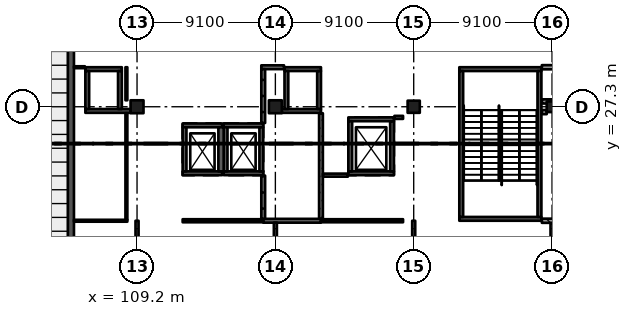
"""IFC4 building model, lengths in metres.
Left out: names, types, materials, properties, quantities, classifications, styles, units other than length and angle.
Written with IfcOpenShell. Run it as: python <this file> out.ifc"""

import sys

from ifc_helpers import new_model, si_unit, direction, frame, frame_2d, origin, origin_2d, place, context, subcontext, project, spatial, rectangle, extrude, element, fill, save


model = new_model("IFC4")
c1 = context("Model", 3, precision=1e-05, world=origin(), true_north=direction((0.0, 1.0)))
c2 = subcontext(c1, "Body", "Model", "MODEL_VIEW")
j1 = project(units=[si_unit("LENGTHUNIT", "METRE"), si_unit("PLANEANGLEUNIT", "RADIAN")], contexts=[c1])
p1 = place(None, origin())
s1 = spatial("IfcSite", under=j1, at=p1, CompositionType="ELEMENT")
p2 = place(p1, origin())
s2 = spatial("IfcBuilding", under=s1, at=p2, CompositionType="ELEMENT")
p3 = place(p2, origin())
s3 = spatial("IfcBuildingStorey", under=s2, at=p3, CompositionType="ELEMENT", Elevation=0.0)
for number, where, z_axis, x_axis in (
    (1, (109.2, 27.3, -0.4), (0.0, 0.0, 1.0), (1.0, 0.0, 0.0)),
    (2, (118.3, 27.3, -0.4), (0.0, 0.0, 1.0), (1.0, 0.0, 0.0)),
):
    element("IfcColumn", number, at=place(p3, frame(where, z_axis=z_axis, x_axis=x_axis)), inside=s3, PredefinedType="COLUMN", context=c2, shape_type="SweptSolid", body=[
        extrude(rectangle(XDim=0.85, YDim=0.85, at=origin_2d()), origin(), (0.0, 0.0, 1.0), 6.77),
    ])
p4 = place(p3, frame((127.4, 27.3, -0.4), z_axis=(0.0, 0.0, 1.0), x_axis=(1.0, 0.0, 0.0)))
e3 = element("IfcColumn", 3, at=p4, inside=s3, PredefinedType="COLUMN", context=c2, shape_type="SweptSolid", body=[
    extrude(rectangle(XDim=0.8, YDim=0.8, at=origin_2d()), origin(), (0.0, 0.0, 1.0), 6.77),
])
p5 = place(p3, frame((136.5, 27.3, -0.4), z_axis=(0.0, 0.0, 1.0), x_axis=(1.0, 0.0, 0.0)))
e4 = element("IfcColumn", 4, at=p5, inside=s3, PredefinedType="COLUMN", context=c2, shape_type="SweptSolid", body=[
    extrude(rectangle(XDim=0.7, YDim=0.7, at=origin_2d()), origin(), (0.0, 0.0, 1.0), 6.77),
])
p6 = place(p3, frame((104.85, 36.4, -0.4), z_axis=(0.0, 0.0, 1.0), x_axis=(0.0, -1.0, 0.0)))
e5 = element("IfcWall", 5, at=p6, inside=s3, PredefinedType="SHEAR", context=c2, shape_type="SweptSolid", body=[
    extrude(rectangle(XDim=18.2, YDim=0.4, at=frame_2d((9.1, 0.0))), origin(), (0.0, 0.0, 1.0), 6.77),
])
p7 = place(p3, frame((117.5, 22.925, -1.4), z_axis=(0.0, 0.0, 1.0), x_axis=(-1.0, 0.0, 0.0)))
e6 = element("IfcWall", 6, at=p7, inside=s3, PredefinedType="SHEAR", context=c2, shape_type="SweptSolid", body=[
    extrude(rectangle(XDim=2.6, YDim=0.25, at=frame_2d((1.3, 0.0))), origin(), (0.0, 0.0, 1.0), 7.77),
])
p8 = place(p7, frame((0.8, 0.0, 1.4)))
e7 = element("IfcOpeningElement", 7, at=p8, cuts=e6, PredefinedType="OPENING", context=c2, shape_type="SweptSolid", body=[
    extrude(rectangle(XDim=1.0, YDim=2.1, at=frame_2d((0.5, 1.05))), frame((0.0, 0.135, 0.0), z_axis=(0.0, -1.0, 0.0), x_axis=(1.0, 0.0, 0.0)), (0.0, 0.0, 1.0), 0.27),
])
p9 = place(p3, frame((117.5, 26.075, -1.4), z_axis=(0.0, 0.0, 1.0), x_axis=(-1.0, 0.0, 0.0)))
e8 = element("IfcWall", 8, at=p9, inside=s3, PredefinedType="SHEAR", context=c2, shape_type="SweptSolid", body=[
    extrude(rectangle(XDim=2.6, YDim=0.25, at=frame_2d((1.3, 0.0))), origin(), (0.0, 0.0, 1.0), 7.77),
])
for number, where, z_axis, x_axis in (
    (9, (115.025, 25.95, -1.4), (0.0, 0.0, 1.0), (0.0, -1.0, 0.0)),
    (10, (117.375, 25.95, -1.4), (0.0, 0.0, 1.0), (0.0, -1.0, 0.0)),
):
    element("IfcWall", number, at=place(p3, frame(where, z_axis=z_axis, x_axis=x_axis)), inside=s3, PredefinedType="SHEAR", context=c2, shape_type="SweptSolid", body=[
        extrude(rectangle(XDim=2.9, YDim=0.25, at=frame_2d((1.45, 0.0))), origin(), (0.0, 0.0, 1.0), 7.77),
    ])
p10 = place(p3, frame((114.8, 22.925, -1.4), z_axis=(0.0, 0.0, 1.0), x_axis=(-1.0, 0.0, 0.0)))
e11 = element("IfcWall", 11, at=p10, inside=s3, PredefinedType="SHEAR", context=c2, shape_type="SweptSolid", body=[
    extrude(rectangle(XDim=2.6, YDim=0.25, at=frame_2d((1.3, 0.0))), origin(), (0.0, 0.0, 1.0), 7.77),
])
p11 = place(p10, frame((0.8, 0.0, 1.4)))
e12 = element("IfcOpeningElement", 12, at=p11, cuts=e11, PredefinedType="OPENING", context=c2, shape_type="SweptSolid", body=[
    extrude(rectangle(XDim=1.0, YDim=2.1, at=frame_2d((0.5, 1.05))), frame((0.0, 0.135, 0.0), z_axis=(0.0, -1.0, 0.0), x_axis=(1.0, 0.0, 0.0)), (0.0, 0.0, 1.0), 0.27),
])
p12 = place(p3, frame((114.8, 26.075, -1.4), z_axis=(0.0, 0.0, 1.0), x_axis=(-1.0, 0.0, 0.0)))
e13 = element("IfcWall", 13, at=p12, inside=s3, PredefinedType="SHEAR", context=c2, shape_type="SweptSolid", body=[
    extrude(rectangle(XDim=2.6, YDim=0.25, at=frame_2d((1.3, 0.0))), origin(), (0.0, 0.0, 1.0), 7.77),
])
p13 = place(p3, frame((112.325, 25.95, -1.4), z_axis=(0.0, 0.0, 1.0), x_axis=(0.0, -1.0, 0.0)))
e14 = element("IfcWall", 14, at=p13, inside=s3, PredefinedType="SHEAR", context=c2, shape_type="SweptSolid", body=[
    extrude(rectangle(XDim=2.9, YDim=0.25, at=frame_2d((1.45, 0.0))), origin(), (0.0, 0.0, 1.0), 7.77),
])
p14 = place(p3, frame((114.725, 25.95, -1.4), z_axis=(0.0, 0.0, 1.0), x_axis=(0.0, -1.0, 0.0)))
e15 = element("IfcWall", 15, at=p14, inside=s3, PredefinedType="SHEAR", context=c2, shape_type="SweptSolid", body=[
    extrude(rectangle(XDim=2.9, YDim=0.35, at=frame_2d((1.45, 0.0))), origin(), (0.0, 0.0, 1.0), 7.77),
])
p15 = place(p3, frame((108.775, 27.025, -0.4), z_axis=(0.0, 0.0, 1.0), x_axis=(-1.0, 0.0, 0.0)))
e16 = element("IfcWall", 16, at=p15, inside=s3, PredefinedType="SHEAR", context=c2, shape_type="SweptSolid", body=[
    extrude(rectangle(XDim=2.975, YDim=0.25, at=frame_2d((1.487, 0.0))), origin(), (0.0, 0.0, 1.0), 6.77),
])
p16 = place(p15, frame((0.75, 0.0, 0.4)))
e17 = element("IfcOpeningElement", 17, at=p16, cuts=e16, PredefinedType="OPENING", context=c2, shape_type="SweptSolid", body=[
    extrude(rectangle(XDim=0.9, YDim=2.1, at=frame_2d((0.45, 1.05))), frame((0.0, 0.135, 0.0), z_axis=(0.0, -1.0, 0.0), x_axis=(1.0, 0.0, 0.0)), (0.0, 0.0, 1.0), 0.27),
])
p17 = place(p3, frame((108.2, 29.775, -0.4), z_axis=(0.0, 0.0, 1.0), x_axis=(-1.0, 0.0, 0.0)))
e18 = element("IfcWall", 18, at=p17, inside=s3, PredefinedType="SHEAR", context=c2, shape_type="SweptSolid", body=[
    extrude(rectangle(XDim=2.4, YDim=0.25, at=frame_2d((1.2, 0.0))), origin(), (0.0, 0.0, 1.0), 6.77),
])
for number, where, z_axis, x_axis in (
    (19, (105.925, 29.65, -0.4), (0.0, 0.0, 1.0), (0.0, -1.0, 0.0)),
    (20, (108.075, 29.65, -0.4), (0.0, 0.0, 1.0), (0.0, -1.0, 0.0)),
):
    element("IfcWall", number, at=place(p3, frame(where, z_axis=z_axis, x_axis=x_axis)), inside=s3, PredefinedType="SHEAR", context=c2, shape_type="SweptSolid", body=[
        extrude(rectangle(XDim=2.5, YDim=0.25, at=frame_2d((1.25, 0.0))), origin(), (0.0, 0.0, 1.0), 6.77),
    ])
p18 = place(p3, frame((121.3, 27.025, -0.4), z_axis=(0.0, 0.0, 1.0), x_axis=(-1.0, 0.0, 0.0)))
e21 = element("IfcWall", 21, at=p18, inside=s3, PredefinedType="SHEAR", context=c2, shape_type="SweptSolid", body=[
    extrude(rectangle(XDim=2.575, YDim=0.25, at=frame_2d((1.288, 0.0))), origin(), (0.0, 0.0, 1.0), 6.77),
])
p19 = place(p3, frame((121.3, 29.775, -0.4), z_axis=(0.0, 0.0, 1.0), x_axis=(-1.0, 0.0, 0.0)))
e22 = element("IfcWall", 22, at=p19, inside=s3, PredefinedType="SHEAR", context=c2, shape_type="SweptSolid", body=[
    extrude(rectangle(XDim=2.4, YDim=0.25, at=frame_2d((1.2, 0.0))), origin(), (0.0, 0.0, 1.0), 6.77),
])
p20 = place(p3, frame((119.025, 29.65, -0.4), z_axis=(0.0, 0.0, 1.0), x_axis=(0.0, -1.0, 0.0)))
e23 = element("IfcWall", 23, at=p20, inside=s3, PredefinedType="SHEAR", context=c2, shape_type="SweptSolid", body=[
    extrude(rectangle(XDim=2.5, YDim=0.25, at=frame_2d((1.25, 0.0))), origin(), (0.0, 0.0, 1.0), 6.77),
])
p21 = place(p3, frame((121.175, 29.65, -0.4), z_axis=(0.0, 0.0, 1.0), x_axis=(0.0, -1.0, 0.0)))
e24 = element("IfcWall", 24, at=p21, inside=s3, PredefinedType="SHEAR", context=c2, shape_type="SweptSolid", body=[
    extrude(rectangle(XDim=2.5, YDim=0.25, at=frame_2d((1.25, 0.0))), origin(), (0.0, 0.0, 1.0), 6.77),
])
p22 = place(p21, frame((0.9, 0.0, 0.4)))
e25 = element("IfcOpeningElement", 25, at=p22, cuts=e24, PredefinedType="OPENING", context=c2, shape_type="SweptSolid", body=[
    extrude(rectangle(XDim=0.7, YDim=2.1, at=frame_2d((0.35, 1.05))), frame((0.0, 0.135, 0.0), z_axis=(0.0, -1.0, 0.0), x_axis=(1.0, 0.0, 0.0)), (0.0, 0.0, 1.0), 0.27),
])
p23 = place(p3, frame((126.1, 22.925, -1.4), z_axis=(0.0, 0.0, 1.0), x_axis=(-1.0, 0.0, 0.0)))
e26 = element("IfcWall", 26, at=p23, inside=s3, PredefinedType="SHEAR", context=c2, shape_type="SweptSolid", body=[
    extrude(rectangle(XDim=3.0, YDim=0.25, at=frame_2d((1.5, 0.0))), origin(), (0.0, 0.0, 1.0), 7.77),
])
p24 = place(p23, frame((0.95, 0.0, 1.4)))
e27 = element("IfcOpeningElement", 27, at=p24, cuts=e26, PredefinedType="OPENING", context=c2, shape_type="SweptSolid", body=[
    extrude(rectangle(XDim=1.1, YDim=2.1, at=frame_2d((0.55, 1.05))), frame((0.0, 0.135, 0.0), z_axis=(0.0, -1.0, 0.0), x_axis=(1.0, 0.0, 0.0)), (0.0, 0.0, 1.0), 0.27),
])
p25 = place(p3, frame((126.1, 26.475, -1.4), z_axis=(0.0, 0.0, 1.0), x_axis=(-1.0, 0.0, 0.0)))
e28 = element("IfcWall", 28, at=p25, inside=s3, PredefinedType="SHEAR", context=c2, shape_type="SweptSolid", body=[
    extrude(rectangle(XDim=3.0, YDim=0.25, at=frame_2d((1.5, 0.0))), origin(), (0.0, 0.0, 1.0), 7.77),
])
for number, where, z_axis, x_axis in (
    (29, (123.225, 26.35, -1.4), (0.0, 0.0, 1.0), (0.0, -1.0, 0.0)),
    (30, (125.975, 26.35, -1.4), (0.0, 0.0, 1.0), (0.0, -1.0, 0.0)),
):
    element("IfcWall", number, at=place(p3, frame(where, z_axis=z_axis, x_axis=x_axis)), inside=s3, PredefinedType="SHEAR", context=c2, shape_type="SweptSolid", body=[
        extrude(rectangle(XDim=3.3, YDim=0.25, at=frame_2d((1.65, 0.0))), origin(), (0.0, 0.0, 1.0), 7.77),
    ])
p26 = place(p3, frame((135.8, 19.925, -0.4), z_axis=(0.0, 0.0, 1.0), x_axis=(-1.0, 0.0, 0.0)))
e31 = element("IfcWall", 31, at=p26, inside=s3, PredefinedType="SHEAR", context=c2, shape_type="SweptSolid", body=[
    extrude(rectangle(XDim=5.4, YDim=0.25, at=frame_2d((2.7, 0.0))), origin(), (0.0, 0.0, 1.0), 6.77),
])
p27 = place(p26, frame((1.5, 0.0, 0.4)))
e32 = element("IfcOpeningElement", 32, at=p27, cuts=e31, PredefinedType="OPENING", context=c2, shape_type="SweptSolid", body=[
    extrude(rectangle(XDim=2.4, YDim=2.1, at=frame_2d((1.2, 1.05))), frame((0.0, 0.135, 0.0), z_axis=(0.0, -1.0, 0.0), x_axis=(1.0, 0.0, 0.0)), (0.0, 0.0, 1.0), 0.27),
])
p28 = place(p3, frame((135.8, 29.775, -0.4), z_axis=(0.0, 0.0, 1.0), x_axis=(-1.0, 0.0, 0.0)))
e33 = element("IfcWall", 33, at=p28, inside=s3, PredefinedType="SHEAR", context=c2, shape_type="SweptSolid", body=[
    extrude(rectangle(XDim=5.4, YDim=0.25, at=frame_2d((2.7, 0.0))), origin(), (0.0, 0.0, 1.0), 6.77),
])
for number, where, z_axis, x_axis in (
    (34, (130.525, 29.65, -0.4), (0.0, 0.0, 1.0), (0.0, -1.0, 0.0)),
    (35, (135.675, 29.65, -0.4), (0.0, 0.0, 1.0), (0.0, -1.0, 0.0)),
):
    element("IfcWall", number, at=place(p3, frame(where, z_axis=z_axis, x_axis=x_axis)), inside=s3, PredefinedType="SHEAR", context=c2, shape_type="SweptSolid", body=[
        extrude(rectangle(XDim=9.6, YDim=0.25, at=frame_2d((4.8, 0.0))), origin(), (0.0, 0.0, 1.0), 6.77),
    ])
p29 = place(p3, frame((105.05, 19.8, 0.0), z_axis=(0.0, 0.0, 1.0), x_axis=(1.0, 0.0, 0.0)))
e36 = element("IfcWall", 36, at=p29, inside=s3, PredefinedType="PARTITIONING", context=c2, shape_type="SweptSolid", body=[
    extrude(rectangle(XDim=3.512, YDim=0.125, at=frame_2d((1.756, 0.0))), origin(), (0.0, 0.0, 1.0), 6.02),
])
p30 = place(p29, frame((1.35, 0.0, 0.0)))
e37 = element("IfcOpeningElement", 37, at=p30, cuts=e36, PredefinedType="OPENING", context=c2, shape_type="SweptSolid", body=[
    extrude(rectangle(XDim=0.9, YDim=2.1, at=frame_2d((0.45, 1.05))), frame((0.0, 0.073, 0.0), z_axis=(0.0, -1.0, 0.0), x_axis=(1.0, 0.0, 0.0)), (0.0, 0.0, 1.0), 0.145),
])
p31 = place(p3, frame((105.05, 29.9, 0.0), z_axis=(0.0, 0.0, 1.0), x_axis=(1.0, 0.0, 0.0)))
e38 = element("IfcWall", 38, at=p31, inside=s3, PredefinedType="PARTITIONING", context=c2, shape_type="SweptSolid", body=[
    extrude(rectangle(XDim=0.72, YDim=0.125, at=frame_2d((0.36, 0.0))), origin(), (0.0, 0.0, 1.0), 6.02),
])
p32 = place(p3, frame((108.5, 19.863, 0.0), z_axis=(0.0, 0.0, 1.0), x_axis=(0.0, 1.0, 0.0)))
e39 = element("IfcWall", 39, at=p32, inside=s3, PredefinedType="PARTITIONING", context=c2, shape_type="SweptSolid", body=[
    extrude(rectangle(XDim=7.012, YDim=0.125, at=frame_2d((3.506, 0.0))), origin(), (0.0, 0.0, 1.0), 6.02),
])
p33 = place(p3, frame((108.5, 27.725, 0.0), z_axis=(0.0, 0.0, 1.0), x_axis=(0.0, 1.0, 0.0)))
e40 = element("IfcWall", 40, at=p33, inside=s3, PredefinedType="PARTITIONING", context=c2, shape_type="SweptSolid", body=[
    extrude(rectangle(XDim=2.175, YDim=0.125, at=frame_2d((1.087, 0.0))), origin(), (0.0, 0.0, 1.0), 6.02),
])
p34 = place(p3, frame((109.2, 18.675, 0.0), z_axis=(0.0, 0.0, 1.0), x_axis=(0.0, 1.0, 0.0)))
e41 = element("IfcWall", 41, at=p34, inside=s3, PredefinedType="PARTITIONING", context=c2, shape_type="SweptSolid", body=[
    extrude(rectangle(XDim=1.125, YDim=0.2, at=frame_2d((0.562, 0.0))), origin(), (0.0, 0.0, 1.0), 5.32),
])
p35 = place(p3, frame((112.2, 19.8, 0.0), z_axis=(0.0, 0.0, 1.0), x_axis=(1.0, 0.0, 0.0)))
e42 = element("IfcWall", 42, at=p35, inside=s3, PredefinedType="PARTITIONING", context=c2, shape_type="SweptSolid", body=[
    extrude(rectangle(XDim=5.3, YDim=0.2, at=frame_2d((2.65, 0.0))), origin(), (0.0, 0.0, 1.0), 6.02),
])
p36 = place(p35, frame((1.75, 0.0, 0.0)))
e43 = element("IfcOpeningElement", 43, at=p36, cuts=e42, PredefinedType="OPENING", context=c2, shape_type="SweptSolid", body=[
    extrude(rectangle(XDim=1.8, YDim=2.4, at=frame_2d((0.9, 1.2))), frame((0.0, 0.11, 0.0), z_axis=(0.0, -1.0, 0.0), x_axis=(1.0, 0.0, 0.0)), (0.0, 0.0, 1.0), 0.22),
])
p37 = place(p3, frame((117.375, 29.9, 0.0), z_axis=(0.0, 0.0, 1.0), x_axis=(1.0, 0.0, 0.0)))
e44 = element("IfcWall", 44, at=p37, inside=s3, PredefinedType="SOLIDWALL", context=c2, shape_type="SweptSolid", body=[
    extrude(rectangle(XDim=1.495, YDim=0.25, at=frame_2d((0.748, 0.0))), origin(), (0.0, 0.0, 1.0), 6.02),
])
p38 = place(p3, frame((117.5, 19.8, 0.0), z_axis=(0.0, 0.0, 1.0), x_axis=(1.0, 0.0, 0.0)))
e45 = element("IfcWall", 45, at=p38, inside=s3, PredefinedType="SOLIDWALL", context=c2, shape_type="SweptSolid", body=[
    extrude(rectangle(XDim=3.8, YDim=0.25, at=frame_2d((1.9, 0.0))), origin(), (0.0, 0.0, 1.0), 6.02),
])
p39 = place(p38, frame((1.85, 0.0, 0.0)))
e46 = element("IfcOpeningElement", 46, at=p39, cuts=e45, PredefinedType="OPENING", context=c2, shape_type="SweptSolid", body=[
    extrude(rectangle(XDim=1.0, YDim=2.1, at=frame_2d((0.5, 1.05))), frame((0.0, 0.135, 0.0), z_axis=(0.0, -1.0, 0.0), x_axis=(1.0, 0.0, 0.0)), (0.0, 0.0, 1.0), 0.27),
])
p40 = place(p3, frame((117.5, 19.925, 0.0), z_axis=(0.0, 0.0, 1.0), x_axis=(0.0, 1.0, 0.0)))
e47 = element("IfcWall", 47, at=p40, inside=s3, PredefinedType="SOLIDWALL", context=c2, shape_type="SweptSolid", body=[
    extrude(rectangle(XDim=2.845, YDim=0.25, at=frame_2d((1.422, 0.0))), origin(), (0.0, 0.0, 1.0), 6.02),
])
p41 = place(p3, frame((117.5, 26.23, 0.0), z_axis=(0.0, 0.0, 1.0), x_axis=(0.0, 1.0, 0.0)))
e48 = element("IfcWall", 48, at=p41, inside=s3, PredefinedType="SOLIDWALL", context=c2, shape_type="SweptSolid", body=[
    extrude(rectangle(XDim=3.545, YDim=0.25, at=frame_2d((1.772, 0.0))), origin(), (0.0, 0.0, 1.0), 6.02),
])
p42 = place(p3, frame((118.3, 18.675, 0.0), z_axis=(0.0, 0.0, 1.0), x_axis=(0.0, 1.0, 0.0)))
e49 = element("IfcWall", 49, at=p42, inside=s3, PredefinedType="PARTITIONING", context=c2, shape_type="SweptSolid", body=[
    extrude(rectangle(XDim=1.0, YDim=0.2, at=frame_2d((0.5, 0.0))), origin(), (0.0, 0.0, 1.0), 5.32),
])
p43 = place(p3, frame((121.3, 19.8, 0.0), z_axis=(0.0, 0.0, 1.0), x_axis=(1.0, 0.0, 0.0)))
e50 = element("IfcWall", 50, at=p43, inside=s3, PredefinedType="PARTITIONING", context=c2, shape_type="SweptSolid", body=[
    extrude(rectangle(XDim=5.4, YDim=0.2, at=frame_2d((2.7, 0.0))), origin(), (0.0, 0.0, 1.0), 6.02),
])
p44 = place(p43, frame((1.85, 0.0, 0.0)))
e51 = element("IfcOpeningElement", 51, at=p44, cuts=e50, PredefinedType="OPENING", context=c2, shape_type="SweptSolid", body=[
    extrude(rectangle(XDim=1.8, YDim=2.4, at=frame_2d((0.9, 1.2))), frame((0.0, 0.11, 0.0), z_axis=(0.0, -1.0, 0.0), x_axis=(1.0, 0.0, 0.0)), (0.0, 0.0, 1.0), 0.22),
])
p45 = place(p3, frame((121.3, 19.925, 0.0), z_axis=(0.0, 0.0, 1.0), x_axis=(0.0, 1.0, 0.0)))
e52 = element("IfcWall", 52, at=p45, inside=s3, PredefinedType="SOLIDWALL", context=c2, shape_type="SweptSolid", body=[
    extrude(rectangle(XDim=6.945, YDim=0.25, at=frame_2d((3.473, 0.0))), origin(), (0.0, 0.0, 1.0), 6.02),
])
p46 = place(p3, frame((121.425, 22.8, 0.0), z_axis=(0.0, 0.0, 1.0), x_axis=(1.0, 0.0, 0.0)))
e53 = element("IfcWall", 53, at=p46, inside=s3, PredefinedType="PARTITIONING", context=c2, shape_type="SweptSolid", body=[
    extrude(rectangle(XDim=1.645, YDim=0.2, at=frame_2d((0.823, 0.0))), origin(), (0.0, 0.0, 1.0), 6.02),
])
p47 = place(p3, frame((126.13, 26.6, 0.0), z_axis=(0.0, 0.0, 1.0), x_axis=(1.0, 0.0, 0.0)))
e54 = element("IfcWall", 54, at=p47, inside=s3, PredefinedType="PARTITIONING", context=c2, shape_type="SweptSolid", body=[
    extrude(rectangle(XDim=0.57, YDim=0.2, at=frame_2d((0.285, 0.0))), origin(), (0.0, 0.0, 1.0), 6.02),
])
p48 = place(p3, frame((127.4, 18.65, 0.0), z_axis=(0.0, 0.0, 1.0), x_axis=(0.0, 1.0, 0.0)))
e55 = element("IfcWall", 55, at=p48, inside=s3, PredefinedType="PARTITIONING", context=c2, shape_type="SweptSolid", body=[
    extrude(rectangle(XDim=1.15, YDim=0.2, at=frame_2d((0.575, 0.0))), origin(), (0.0, 0.0, 1.0), 5.32),
])
p49 = place(p3, frame((135.83, 19.8, 0.0), z_axis=(0.0, 0.0, 1.0), x_axis=(1.0, 0.0, 0.0)))
e56 = element("IfcWall", 56, at=p49, inside=s3, PredefinedType="SOLIDWALL", context=c2, shape_type="SweptSolid", body=[
    extrude(rectangle(XDim=3.64, YDim=0.275, at=frame_2d((1.82, 0.0))), origin(), (0.0, 0.0, 1.0), 6.02),
])
p50 = place(p49, frame((1.52, 0.0, 0.0)))
e57 = element("IfcOpeningElement", 57, at=p50, cuts=e56, PredefinedType="OPENING", context=c2, shape_type="SweptSolid", body=[
    extrude(rectangle(XDim=1.2, YDim=2.4, at=frame_2d((0.6, 1.2))), frame((0.0, 0.147, 0.0), z_axis=(0.0, -1.0, 0.0), x_axis=(1.0, 0.0, 0.0)), (0.0, 0.0, 1.0), 0.295),
])
p51 = place(p3, frame((135.83, 26.95, 0.0), z_axis=(0.0, 0.0, 1.0), x_axis=(1.0, 0.0, 0.0)))
e58 = element("IfcWall", 58, at=p51, inside=s3, PredefinedType="SOLIDWALL", context=c2, shape_type="SweptSolid", body=[
    extrude(rectangle(XDim=0.32, YDim=0.275, at=frame_2d((0.16, 0.0))), origin(), (0.0, 0.0, 1.0), 6.02),
])
p52 = place(p3, frame((135.83, 27.65, 0.0), z_axis=(0.0, 0.0, 1.0), x_axis=(1.0, 0.0, 0.0)))
e59 = element("IfcWall", 59, at=p52, inside=s3, PredefinedType="SOLIDWALL", context=c2, shape_type="SweptSolid", body=[
    extrude(rectangle(XDim=0.67, YDim=0.275, at=frame_2d((0.335, 0.0))), origin(), (0.0, 0.0, 1.0), 6.02),
])
p53 = place(p3, frame((135.83, 29.9, 0.0), z_axis=(0.0, 0.0, 1.0), x_axis=(1.0, 0.0, 0.0)))
e60 = element("IfcWall", 60, at=p53, inside=s3, PredefinedType="SOLIDWALL", context=c2, shape_type="SweptSolid", body=[
    extrude(rectangle(XDim=3.64, YDim=0.275, at=frame_2d((1.82, 0.0))), origin(), (0.0, 0.0, 1.0), 6.02),
])
p54 = place(p3, frame((136.5, 18.625, 0.0), z_axis=(0.0, 0.0, 1.0), x_axis=(0.0, 1.0, 0.0)))
e61 = element("IfcWall", 61, at=p54, inside=s3, PredefinedType="PARTITIONING", context=c2, shape_type="SweptSolid", body=[
    extrude(rectangle(XDim=1.038, YDim=0.2, at=frame_2d((0.519, 0.0))), origin(), (0.0, 0.0, 1.0), 5.32),
])
p55 = place(p39, origin())
e62 = element("IfcDoor", 62, at=p55, inside=s3, OperationType="SINGLE_SWING_LEFT", PredefinedType="DOOR", context=c2, shape_type="SweptSolid", body=[
    extrude(rectangle(XDim=1.0, YDim=2.1, at=frame_2d((0.5, 1.05))), frame((0.0, 0.025, 0.0), z_axis=(0.0, -1.0, 0.0), x_axis=(1.0, 0.0, 0.0)), (0.0, 0.0, 1.0), 0.05),
])
fill(e46, e62)
p56 = place(p30, origin())
e63 = element("IfcDoor", 63, at=p56, inside=s3, OperationType="SINGLE_SWING_LEFT", PredefinedType="DOOR", context=c2, shape_type="SweptSolid", body=[
    extrude(rectangle(XDim=0.9, YDim=2.1, at=frame_2d((0.45, 1.05))), frame((0.0, 0.025, 0.0), z_axis=(0.0, -1.0, 0.0), x_axis=(1.0, 0.0, 0.0)), (0.0, 0.0, 1.0), 0.05),
])
fill(e37, e63)
p57 = place(p44, origin())
e64 = element("IfcDoor", 64, at=p57, inside=s3, OperationType="DOUBLE_DOOR_SINGLE_SWING", PredefinedType="DOOR", context=c2, shape_type="SweptSolid", body=[
    extrude(rectangle(XDim=1.8, YDim=2.4, at=frame_2d((0.9, 1.2))), frame((0.0, 0.025, 0.0), z_axis=(0.0, -1.0, 0.0), x_axis=(1.0, 0.0, 0.0)), (0.0, 0.0, 1.0), 0.05),
])
fill(e51, e64)
p58 = place(p36, origin())
e65 = element("IfcDoor", 65, at=p58, inside=s3, OperationType="DOUBLE_DOOR_SINGLE_SWING", PredefinedType="DOOR", context=c2, shape_type="SweptSolid", body=[
    extrude(rectangle(XDim=1.8, YDim=2.4, at=frame_2d((0.9, 1.2))), frame((0.0, 0.025, 0.0), z_axis=(0.0, -1.0, 0.0), x_axis=(1.0, 0.0, 0.0)), (0.0, 0.0, 1.0), 0.05),
])
fill(e43, e65)
p59 = place(p16, origin())
e66 = element("IfcDoor", 66, at=p59, inside=s3, OperationType="SINGLE_SWING_LEFT", PredefinedType="DOOR", context=c2, shape_type="SweptSolid", body=[
    extrude(rectangle(XDim=0.9, YDim=2.1, at=frame_2d((0.45, 1.05))), frame((0.0, 0.025, 0.0), z_axis=(0.0, -1.0, 0.0), x_axis=(1.0, 0.0, 0.0)), (0.0, 0.0, 1.0), 0.05),
])
fill(e17, e66)
p60 = place(p22, origin())
e67 = element("IfcDoor", 67, at=p60, inside=s3, OperationType="SINGLE_SWING_RIGHT", PredefinedType="DOOR", context=c2, shape_type="SweptSolid", body=[
    extrude(rectangle(XDim=0.7, YDim=2.1, at=frame_2d((0.35, 1.05))), frame((0.0, 0.025, 0.0), z_axis=(0.0, -1.0, 0.0), x_axis=(1.0, 0.0, 0.0)), (0.0, 0.0, 1.0), 0.05),
])
fill(e25, e67)
p61 = place(p27, origin())
e68 = element("IfcDoor", 68, at=p61, inside=s3, OperationType="DOUBLE_DOOR_SINGLE_SWING", PredefinedType="DOOR", context=c2, shape_type="SweptSolid", body=[
    extrude(rectangle(XDim=2.4, YDim=2.1, at=frame_2d((1.2, 1.05))), frame((0.0, 0.025, 0.0), z_axis=(0.0, -1.0, 0.0), x_axis=(1.0, 0.0, 0.0)), (0.0, 0.0, 1.0), 0.05),
])
fill(e32, e68)
p62 = place(p8, origin())
e69 = element("IfcDoor", 69, at=p62, inside=s3, OperationType="DOUBLE_DOOR_SLIDING", PredefinedType="DOOR", context=c2, shape_type="SweptSolid", body=[
    extrude(rectangle(XDim=1.0, YDim=2.1, at=frame_2d((0.5, 1.05))), frame((0.0, 0.025, 0.0), z_axis=(0.0, -1.0, 0.0), x_axis=(1.0, 0.0, 0.0)), (0.0, 0.0, 1.0), 0.05),
])
fill(e7, e69)
p63 = place(p11, origin())
e70 = element("IfcDoor", 70, at=p63, inside=s3, OperationType="DOUBLE_DOOR_SLIDING", PredefinedType="DOOR", context=c2, shape_type="SweptSolid", body=[
    extrude(rectangle(XDim=1.0, YDim=2.1, at=frame_2d((0.5, 1.05))), frame((0.0, 0.025, 0.0), z_axis=(0.0, -1.0, 0.0), x_axis=(1.0, 0.0, 0.0)), (0.0, 0.0, 1.0), 0.05),
])
fill(e12, e70)
p64 = place(p24, origin())
e71 = element("IfcDoor", 71, at=p64, inside=s3, OperationType="DOUBLE_DOOR_SLIDING", PredefinedType="DOOR", context=c2, shape_type="SweptSolid", body=[
    extrude(rectangle(XDim=1.1, YDim=2.1, at=frame_2d((0.55, 1.05))), frame((0.0, 0.025, 0.0), z_axis=(0.0, -1.0, 0.0), x_axis=(1.0, 0.0, 0.0)), (0.0, 0.0, 1.0), 0.05),
])
fill(e27, e71)
save(model, sys.argv[1])
